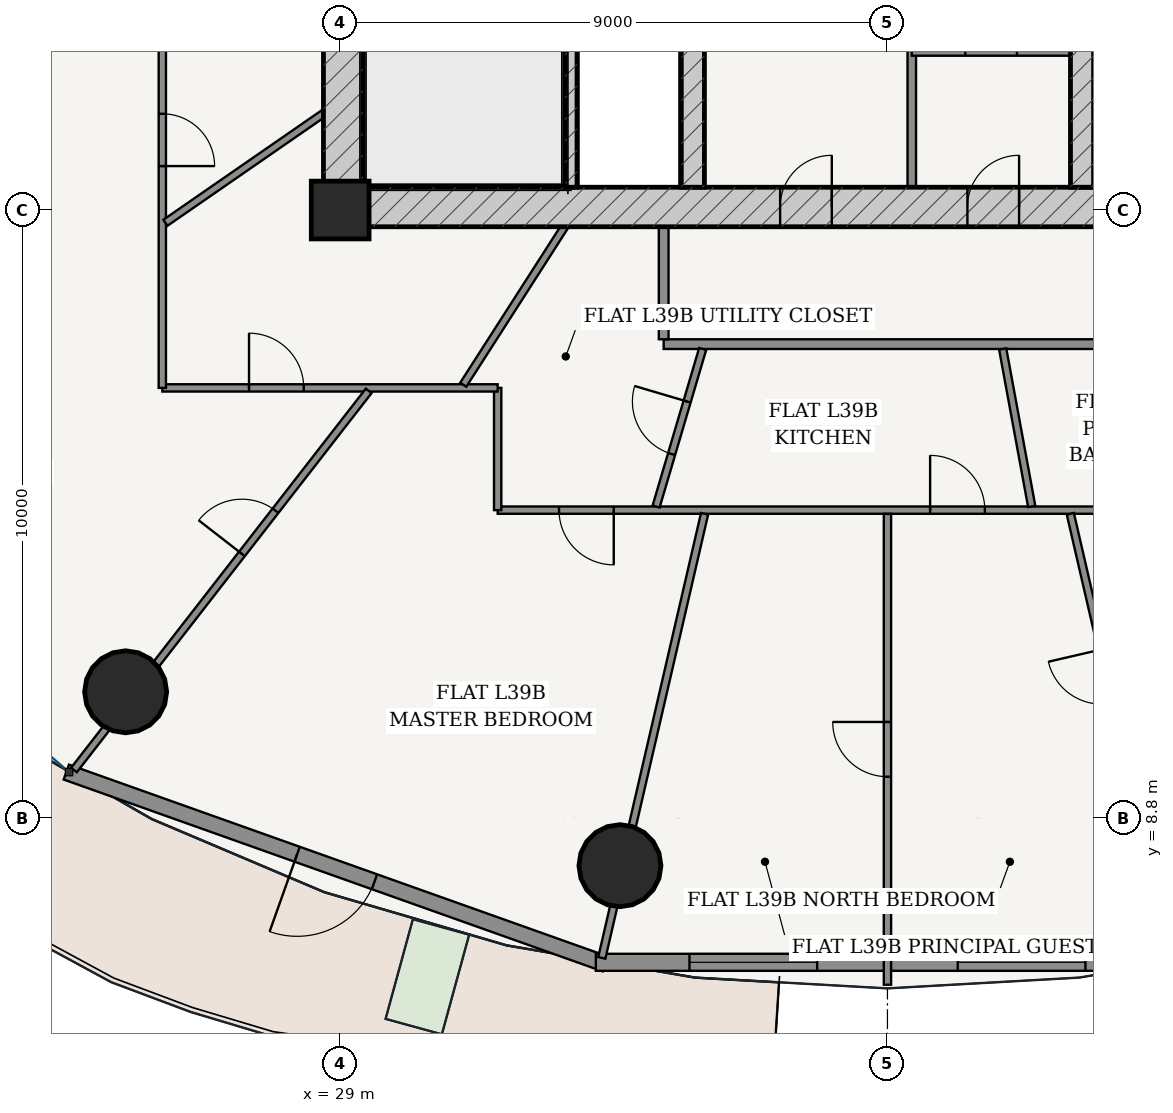
"""IFC4 building model, lengths in metres.
Left out: names, types, materials, properties, quantities, classifications, styles, units other than length and angle.
Written with IfcOpenShell. Run it as: python <this file> out.ifc"""

import sys

from ifc_helpers import new_model, si_unit, direction, frame, frame_2d, origin, origin_2d, place, context, subcontext, project, spatial, rectangle, hollow_circle, extrude, source, transform, mapped, element, fill, save


model = new_model("IFC4")
c1 = context("Model", 3, precision=1e-05, world=origin(), true_north=direction((-0.2419218956, 0.970295726276)))
c2 = subcontext(c1, "Body", "Model", "MODEL_VIEW")
j1 = project(units=[si_unit("LENGTHUNIT", "METRE"), si_unit("PLANEANGLEUNIT", "RADIAN")], contexts=[c1])
p1 = place(None, origin())
s1 = spatial("IfcSite", under=j1, at=p1, CompositionType="ELEMENT")
p2 = place(p1, origin())
s2 = spatial("IfcBuilding", under=s1, at=p2, CompositionType="ELEMENT")
p3 = place(p2, frame((0.0, 0.0, 149.8)))
s3 = spatial("IfcBuildingStorey", under=s2, at=p3, CompositionType="ELEMENT", Elevation=149.8)
p4 = place(p3, frame((29.0, 18.8, 0.0), z_axis=(0.0, 0.0, 1.0), x_axis=(1.0, 0.0, 0.0)))
e1 = element("IfcColumn", 1, at=p4, inside=s3, PredefinedType="COLUMN", context=c2, shape_type="SweptSolid", body=[
    extrude(rectangle(XDim=0.95, YDim=0.95, at=origin_2d()), origin(), (0.0, 0.0, 1.0), 3.6),
])
p5 = place(p3, frame((28.725, 18.85, 0.0), z_axis=(0.0, 0.0, 1.0), x_axis=(1.0, 0.0, 0.0)))
e2 = element("IfcWall", 2, at=p5, inside=s3, PredefinedType="SHEAR", context=c2, shape_type="SweptSolid", body=[
    extrude(rectangle(XDim=18.55, YDim=0.65, at=frame_2d((9.275, 0.0))), origin(), (0.0, 0.0, 1.0), 3.33),
])
p6 = place(p5, frame((7.51, 0.0, 0.0)))
e3 = element("IfcOpeningElement", 3, at=p6, cuts=e2, PredefinedType="OPENING", context=c2, shape_type="SweptSolid", body=[
    extrude(rectangle(XDim=0.85, YDim=2.1, at=frame_2d((0.425, 1.05))), frame((0.0, 0.335, 0.0), z_axis=(0.0, -1.0, 0.0), x_axis=(1.0, 0.0, 0.0)), (0.0, 0.0, 1.0), 0.67),
])
p7 = place(p5, frame((10.59, 0.0, 0.0)))
e4 = element("IfcOpeningElement", 4, at=p7, cuts=e2, PredefinedType="OPENING", context=c2, shape_type="SweptSolid", body=[
    extrude(rectangle(XDim=0.85, YDim=2.1, at=frame_2d((0.425, 1.05))), frame((0.0, 0.335, 0.0), z_axis=(0.0, -1.0, 0.0), x_axis=(1.0, 0.0, 0.0)), (0.0, 0.0, 1.0), 0.67),
])
p8 = place(p3, frame((29.05, 19.175, 0.0), z_axis=(0.0, 0.0, 1.0), x_axis=(0.0, 1.0, 0.0)))
e5 = element("IfcWall", 5, at=p8, inside=s3, PredefinedType="SHEAR", context=c2, shape_type="SweptSolid", body=[
    extrude(rectangle(XDim=15.25, YDim=0.65, at=frame_2d((7.625, 0.0))), origin(), (0.0, 0.0, 1.0), 3.33),
])
p9 = place(p8, frame((9.875, 0.0, 0.0)))
e6 = element("IfcOpeningElement", 6, at=p9, cuts=e5, PredefinedType="OPENING", context=c2, shape_type="SweptSolid", body=[
    extrude(rectangle(XDim=1.5, YDim=2.2, at=frame_2d((0.75, 1.1))), frame((0.0, 0.335, 0.0), z_axis=(0.0, -1.0, 0.0), x_axis=(1.0, 0.0, 0.0)), (0.0, 0.0, 1.0), 0.67),
])
p10 = place(p3, frame((32.795, 19.175, 0.0), z_axis=(0.0, 0.0, 1.0), x_axis=(0.0, 1.0, 0.0)))
e7 = element("IfcWall", 7, at=p10, inside=s3, PredefinedType="SOLIDWALL", context=c2, shape_type="SweptSolid", body=[
    extrude(rectangle(XDim=7.375, YDim=0.2, at=frame_2d((3.688, 0.0))), origin(), (0.0, 0.0, 1.0), 3.33),
])
p11 = place(p3, frame((34.8, 19.175, 0.0), z_axis=(0.0, 0.0, 1.0), x_axis=(0.0, 1.0, 0.0)))
e8 = element("IfcWall", 8, at=p11, inside=s3, PredefinedType="SHEAR", context=c2, shape_type="SweptSolid", body=[
    extrude(rectangle(XDim=15.25, YDim=0.38, at=frame_2d((7.625, 0.0))), origin(), (0.0, 0.0, 1.0), 3.33),
])
p12 = place(p11, frame((7.8, 0.0, 0.0)))
e9 = element("IfcOpeningElement", 9, at=p12, cuts=e8, PredefinedType="OPENING", context=c2, shape_type="SweptSolid", body=[
    extrude(rectangle(XDim=1.05, YDim=2.15, at=frame_2d((0.525, 1.075))), frame((0.0, 0.2, 0.0), z_axis=(0.0, -1.0, 0.0), x_axis=(1.0, 0.0, 0.0)), (0.0, 0.0, 1.0), 0.4),
])
p13 = place(p3, frame((41.2, 19.175, 0.0), z_axis=(0.0, 0.0, 1.0), x_axis=(0.0, 1.0, 0.0)))
e10 = element("IfcWall", 10, at=p13, inside=s3, PredefinedType="SHEAR", context=c2, shape_type="SweptSolid", body=[
    extrude(rectangle(XDim=15.25, YDim=0.38, at=frame_2d((7.625, 0.0))), origin(), (0.0, 0.0, 1.0), 3.33),
])
p14 = place(p13, frame((7.8, 0.0, 0.0)))
e11 = element("IfcOpeningElement", 11, at=p14, cuts=e10, PredefinedType="OPENING", context=c2, shape_type="SweptSolid", body=[
    extrude(rectangle(XDim=1.05, YDim=2.15, at=frame_2d((0.525, 1.075))), frame((0.0, 0.2, 0.0), z_axis=(0.0, -1.0, 0.0), x_axis=(1.0, 0.0, 0.0)), (0.0, 0.0, 1.0), 0.4),
])
for number, where, z_axis, x_axis in (
    (12, (25.472, 10.877, 0.0), (0.0, 0.0, 1.0), (1.0, 0.0, 0.0)),
    (13, (33.601, 8.018, 0.0), (0.0, 0.0, 1.0), (1.0, 0.0, 0.0)),
):
    element("IfcColumn", number, at=place(p3, frame(where, z_axis=z_axis, x_axis=x_axis)), inside=s3, PredefinedType="COLUMN", context=c2, shape_type="SweptSolid", body=[
        extrude(hollow_circle(Radius=0.675, WallThickness=0.042, at=origin_2d()), origin(), (0.0, 0.0, 1.0), 3.6),
    ])
p15 = place(p3, frame((24.497, 9.557, 0.0), z_axis=(0.0, 0.0, 1.0), x_axis=(0.942103604331, -0.335321932934, 0.0)))
e14 = element("IfcWall", 14, at=p15, inside=s3, PredefinedType="SOLIDWALL", context=c2, shape_type="SweptSolid", body=[
    extrude(rectangle(XDim=9.408, YDim=0.26, at=frame_2d((4.704, 0.0))), origin(), (0.0, 0.0, 1.0), 3.33),
])
p16 = place(p15, frame((4.029, 0.0, 0.0)))
e15 = element("IfcOpeningElement", 15, at=p16, cuts=e14, PredefinedType="OPENING", context=c2, shape_type="SweptSolid", body=[
    extrude(rectangle(XDim=1.35, YDim=2.2, at=frame_2d((0.675, 1.1))), frame((0.0, 0.14, 0.0), z_axis=(0.0, -1.0, 0.0), x_axis=(1.0, 0.0, 0.0)), (0.0, 0.0, 1.0), 0.28),
])
p17 = place(p3, frame((33.205, 6.429, 0.0), z_axis=(0.0, 0.0, 1.0), x_axis=(1.0, 0.0, 0.0)))
e16 = element("IfcWall", 16, at=p17, inside=s3, PredefinedType="SOLIDWALL", context=c2, shape_type="SweptSolid", body=[
    extrude(rectangle(XDim=9.591, YDim=0.28, at=frame_2d((4.795, 0.0))), origin(), (0.0, 0.0, 1.0), 3.33),
])
p18 = place(p17, frame((1.54, 0.0, 0.85)))
e17 = element("IfcOpeningElement", 17, at=p18, cuts=e16, PredefinedType="OPENING", context=c2, shape_type="SweptSolid", body=[
    extrude(rectangle(XDim=2.1, YDim=1.95, at=frame_2d((1.05, 0.975))), frame((0.0, 0.15, 0.0), z_axis=(0.0, -1.0, 0.0), x_axis=(1.0, 0.0, 0.0)), (0.0, 0.0, 1.0), 0.3),
])
p19 = place(p17, frame((5.951, 0.0, 0.85)))
e18 = element("IfcOpeningElement", 18, at=p19, cuts=e16, PredefinedType="OPENING", context=c2, shape_type="SweptSolid", body=[
    extrude(rectangle(XDim=2.1, YDim=1.95, at=frame_2d((1.05, 0.975))), frame((0.0, 0.15, 0.0), z_axis=(0.0, -1.0, 0.0), x_axis=(1.0, 0.0, 0.0)), (0.0, 0.0, 1.0), 0.3),
])
p20 = place(p3, frame((38.4, 19.175, 0.0), z_axis=(0.0, 0.0, 1.0), x_axis=(0.0, 1.0, 0.0)))
e19 = element("IfcWall", 19, at=p20, inside=s3, PredefinedType="PARTITIONING", context=c2, shape_type="SweptSolid", body=[
    extrude(rectangle(XDim=4.465, YDim=0.14, at=frame_2d((2.232, 0.0))), origin(), (0.0, 0.0, 1.0), 3.33),
])
p21 = place(p3, frame((38.4, 21.407, 0.0), z_axis=(0.0, 0.0, 1.0), x_axis=(1.0, 0.0, 0.0)))
e20 = element("IfcWall", 20, at=p21, inside=s3, PredefinedType="PARTITIONING", context=c2, shape_type="SweptSolid", body=[
    extrude(rectangle(XDim=2.61, YDim=0.14, at=frame_2d((1.305, 0.0))), origin(), (0.0, 0.0, 1.0), 3.33),
])
p22 = place(p21, frame((0.88, 0.0, 0.0)))
e21 = element("IfcOpeningElement", 21, at=p22, cuts=e20, PredefinedType="OPENING", context=c2, shape_type="SweptSolid", body=[
    extrude(rectangle(XDim=0.85, YDim=2.1, at=frame_2d((0.425, 1.05))), frame((0.0, 0.08, 0.0), z_axis=(0.0, -1.0, 0.0), x_axis=(1.0, 0.0, 0.0)), (0.0, 0.0, 1.0), 0.16),
])
p23 = place(p3, frame((34.32, 16.595, 0.0), z_axis=(0.0, 0.0, 1.0), x_axis=(1.0, 0.0, 0.0)))
e22 = element("IfcWall", 22, at=p23, inside=s3, PredefinedType="PARTITIONING", context=c2, shape_type="SweptSolid", body=[
    extrude(rectangle(XDim=14.885, YDim=0.16, at=frame_2d((7.442, 0.0))), origin(), (0.0, 0.0, 1.0), 2.776),
])
p24 = place(p23, frame((11.609, 0.0, 0.0)))
e23 = element("IfcOpeningElement", 23, at=p24, cuts=e22, PredefinedType="OPENING", context=c2, shape_type="SweptSolid", body=[
    extrude(rectangle(XDim=0.98, YDim=2.2, at=frame_2d((0.49, 1.1))), frame((0.0, 0.09, 0.0), z_axis=(0.0, -1.0, 0.0), x_axis=(1.0, 0.0, 0.0)), (0.0, 0.0, 1.0), 0.18),
])
p25 = place(p3, frame((34.32, 16.675, 0.0), z_axis=(0.0, 0.0, 1.0), x_axis=(0.0, 1.0, 0.0)))
e24 = element("IfcWall", 24, at=p25, inside=s3, PredefinedType="PARTITIONING", context=c2, shape_type="SweptSolid", body=[
    extrude(rectangle(XDim=1.85, YDim=0.16, at=frame_2d((0.925, 0.0))), origin(), (0.0, 0.0, 1.0), 3.33),
])
p26 = place(p3, frame((28.723, 23.497, 0.0), z_axis=(0.0, 0.0, 1.0), x_axis=(-0.942077095572, -0.335396401292, 0.0)))
e25 = element("IfcWall", 25, at=p26, inside=s3, PredefinedType="PARTITIONING", context=c2, shape_type="SweptSolid", body=[
    extrude(rectangle(XDim=13.823, YDim=0.2, at=frame_2d((6.912, 0.0))), origin(), (0.0, 0.0, 1.0), 2.846),
])
p27 = place(p3, frame((51.935, 13.865, 0.0), z_axis=(0.0, 0.0, 1.0), x_axis=(-1.0, 0.0, 0.0)))
e26 = element("IfcWall", 26, at=p27, inside=s3, PredefinedType="PARTITIONING", context=c2, shape_type="SweptSolid", body=[
    extrude(rectangle(XDim=20.345, YDim=0.12, at=frame_2d((10.172, 0.0))), origin(), (0.0, 0.0, 1.0), 2.776),
])
p28 = place(p27, frame((2.985, 0.0, 0.0)))
e27 = element("IfcOpeningElement", 27, at=p28, cuts=e26, PredefinedType="OPENING", context=c2, shape_type="SweptSolid", body=[
    extrude(rectangle(XDim=0.9, YDim=2.15, at=frame_2d((0.45, 1.075))), frame((0.0, 0.07, 0.0), z_axis=(0.0, -1.0, 0.0), x_axis=(1.0, 0.0, 0.0)), (0.0, 0.0, 1.0), 0.14),
])
p29 = place(p27, frame((12.333, 0.0, 0.0)))
e28 = element("IfcOpeningElement", 28, at=p29, cuts=e26, PredefinedType="OPENING", context=c2, shape_type="SweptSolid", body=[
    extrude(rectangle(XDim=0.9, YDim=2.15, at=frame_2d((0.45, 1.075))), frame((0.0, 0.07, 0.0), z_axis=(0.0, -1.0, 0.0), x_axis=(1.0, 0.0, 0.0)), (0.0, 0.0, 1.0), 0.14),
])
p30 = place(p27, frame((18.436, 0.0, 0.0)))
e29 = element("IfcOpeningElement", 29, at=p30, cuts=e26, PredefinedType="OPENING", context=c2, shape_type="SweptSolid", body=[
    extrude(rectangle(XDim=0.9, YDim=2.15, at=frame_2d((0.45, 1.075))), frame((0.0, 0.07, 0.0), z_axis=(0.0, -1.0, 0.0), x_axis=(1.0, 0.0, 0.0)), (0.0, 0.0, 1.0), 0.14),
])
p31 = place(p3, frame((31.59, 13.865, 0.0), z_axis=(0.0, 0.0, 1.0), x_axis=(0.0, 1.0, 0.0)))
e30 = element("IfcWall", 30, at=p31, inside=s3, PredefinedType="PARTITIONING", context=c2, shape_type="SweptSolid", body=[
    extrude(rectangle(XDim=2.01, YDim=0.12, at=frame_2d((1.005, 0.0))), origin(), (0.0, 0.0, 1.0), 3.005),
])
p32 = place(p3, frame((31.59, 15.875, 0.0), z_axis=(0.0, 0.0, 1.0), x_axis=(-1.0, 0.0, 0.0)))
e31 = element("IfcWall", 31, at=p32, inside=s3, PredefinedType="PARTITIONING", context=c2, shape_type="SweptSolid", body=[
    extrude(rectangle(XDim=5.515, YDim=0.12, at=frame_2d((2.758, 0.0))), origin(), (0.0, 0.0, 1.0), 2.776),
])
p33 = place(p32, frame((3.189, 0.0, 0.0)))
e32 = element("IfcOpeningElement", 32, at=p33, cuts=e31, PredefinedType="OPENING", context=c2, shape_type="SweptSolid", body=[
    extrude(rectangle(XDim=0.9, YDim=2.15, at=frame_2d((0.45, 1.075))), frame((0.0, 0.07, 0.0), z_axis=(0.0, -1.0, 0.0), x_axis=(1.0, 0.0, 0.0)), (0.0, 0.0, 1.0), 0.14),
])
p34 = place(p3, frame((26.075, 15.875, 0.0), z_axis=(0.0, 0.0, 1.0), x_axis=(0.0, 1.0, 0.0)))
e33 = element("IfcWall", 33, at=p34, inside=s3, PredefinedType="PARTITIONING", context=c2, shape_type="SweptSolid", body=[
    extrude(rectangle(XDim=5.715, YDim=0.12, at=frame_2d((2.857, 0.0))), origin(), (0.0, 0.0, 1.0), 2.776),
])
p35 = place(p34, frame((3.648, 0.0, 0.0)))
e34 = element("IfcOpeningElement", 34, at=p35, cuts=e33, PredefinedType="OPENING", context=c2, shape_type="SweptSolid", body=[
    extrude(rectangle(XDim=0.86, YDim=2.15, at=frame_2d((0.43, 1.075))), frame((0.0, 0.07, 0.0), z_axis=(0.0, -1.0, 0.0), x_axis=(1.0, 0.0, 0.0)), (0.0, 0.0, 1.0), 0.14),
])
p36 = place(p3, frame((29.469, 15.826, 0.0), z_axis=(0.0, 0.0, 1.0), x_axis=(-0.61373942367, -0.789508657225, 0.0)))
e35 = element("IfcWall", 35, at=p36, inside=s3, PredefinedType="PARTITIONING", context=c2, shape_type="SweptSolid", body=[
    extrude(rectangle(XDim=7.898, YDim=0.12, at=frame_2d((3.949, 0.0))), origin(), (0.0, 0.0, 1.0), 2.776),
])
p37 = place(p36, frame((2.496, 0.0, 0.0)))
e36 = element("IfcOpeningElement", 36, at=p37, cuts=e35, PredefinedType="OPENING", context=c2, shape_type="SweptSolid", body=[
    extrude(rectangle(XDim=0.9, YDim=2.15, at=frame_2d((0.45, 1.075))), frame((0.0, 0.07, 0.0), z_axis=(0.0, -1.0, 0.0), x_axis=(1.0, 0.0, 0.0)), (0.0, 0.0, 1.0), 0.14),
])
p38 = place(p3, frame((34.992, 13.805, 0.0), z_axis=(0.0, 0.0, 1.0), x_axis=(-0.225447000045, -0.974255433739, 0.0)))
e37 = element("IfcWall", 37, at=p38, inside=s3, PredefinedType="PARTITIONING", context=c2, shape_type="SweptSolid", body=[
    extrude(rectangle(XDim=7.496, YDim=0.12, at=frame_2d((3.748, 0.0))), origin(), (0.0, 0.0, 1.0), 2.776),
])
p39 = place(p3, frame((38.0, 13.803, 0.0), z_axis=(0.0, 0.0, 1.0), x_axis=(0.0, -1.0, 0.0)))
e38 = element("IfcWall", 38, at=p39, inside=s3, PredefinedType="PARTITIONING", context=c2, shape_type="SweptSolid", body=[
    extrude(rectangle(XDim=7.743, YDim=0.12, at=frame_2d((3.872, 0.0))), origin(), (0.0, 0.0, 1.0), 2.846),
])
p40 = place(p39, frame((3.421, 0.0, 0.0)))
e39 = element("IfcOpeningElement", 39, at=p40, cuts=e38, PredefinedType="OPENING", context=c2, shape_type="SweptSolid", body=[
    extrude(rectangle(XDim=0.9, YDim=2.15, at=frame_2d((0.45, 1.075))), frame((0.0, 0.07, 0.0), z_axis=(0.0, -1.0, 0.0), x_axis=(1.0, 0.0, 0.0)), (0.0, 0.0, 1.0), 0.14),
])
p41 = place(p3, frame((41.008, 13.805, 0.0), z_axis=(0.0, 0.0, 1.0), x_axis=(0.225447000045, -0.974255433739, 0.0)))
e40 = element("IfcWall", 40, at=p41, inside=s3, PredefinedType="PARTITIONING", context=c2, shape_type="SweptSolid", body=[
    extrude(rectangle(XDim=7.496, YDim=0.12, at=frame_2d((3.748, 0.0))), origin(), (0.0, 0.0, 1.0), 2.776),
])
p42 = place(p41, frame((2.289, 0.0, 0.0)))
e41 = element("IfcOpeningElement", 41, at=p42, cuts=e40, PredefinedType="OPENING", context=c2, shape_type="SweptSolid", body=[
    extrude(rectangle(XDim=0.9, YDim=2.15, at=frame_2d((0.45, 1.075))), frame((0.0, 0.07, 0.0), z_axis=(0.0, -1.0, 0.0), x_axis=(1.0, 0.0, 0.0)), (0.0, 0.0, 1.0), 0.14),
])
p43 = place(p3, frame((28.723, 20.386, 0.0), z_axis=(0.0, 0.0, 1.0), x_axis=(-0.822570551556, -0.568663070467, 0.0)))
e42 = element("IfcWall", 42, at=p43, inside=s3, PredefinedType="PARTITIONING", context=c2, shape_type="SweptSolid", body=[
    extrude(rectangle(XDim=3.158, YDim=0.12, at=frame_2d((1.579, 0.0))), origin(), (0.0, 0.0, 1.0), 3.33),
])
p44 = place(p3, frame((32.691, 18.525, 0.0), z_axis=(0.0, 0.0, 1.0), x_axis=(-0.54002976428, -0.841645919429, 0.0)))
e43 = element("IfcWall", 43, at=p44, inside=s3, PredefinedType="PARTITIONING", context=c2, shape_type="SweptSolid", body=[
    extrude(rectangle(XDim=3.086, YDim=0.12, at=frame_2d((1.543, 0.0))), origin(), (0.0, 0.0, 1.0), 3.33),
])
p45 = place(p3, frame((34.961, 16.515, 0.0), z_axis=(0.0, 0.0, 1.0), x_axis=(-0.283365034326, -0.959012125743, 0.0)))
e44 = element("IfcWall", 44, at=p45, inside=s3, PredefinedType="PARTITIONING", context=c2, shape_type="SweptSolid", body=[
    extrude(rectangle(XDim=2.701, YDim=0.12, at=frame_2d((1.351, 0.0))), origin(), (0.0, 0.0, 1.0), 3.33),
])
p46 = place(p45, frame((0.901, 0.0, 0.0)))
e45 = element("IfcOpeningElement", 45, at=p46, cuts=e44, PredefinedType="OPENING", context=c2, shape_type="SweptSolid", body=[
    extrude(rectangle(XDim=0.9, YDim=2.15, at=frame_2d((0.45, 1.075))), frame((0.0, 0.07, 0.0), z_axis=(0.0, -1.0, 0.0), x_axis=(1.0, 0.0, 0.0)), (0.0, 0.0, 1.0), 0.14),
])
p47 = place(p3, frame((39.895, 16.515, 0.0), z_axis=(0.0, 0.0, 1.0), x_axis=(0.181219081065, -0.983442751083, 0.0)))
e46 = element("IfcWall", 46, at=p47, inside=s3, PredefinedType="PARTITIONING", context=c2, shape_type="SweptSolid", body=[
    extrude(rectangle(XDim=2.633, YDim=0.12, at=frame_2d((1.316, 0.0))), origin(), (0.0, 0.0, 1.0), 3.33),
])
m1 = source(origin(), c2, "Body", "SweptSolid", [
    extrude(rectangle(XDim=1.35, YDim=2.2, at=frame_2d((0.675, 1.1))), frame((0.0, 0.025, 0.0), z_axis=(0.0, -1.0, 0.0), x_axis=(1.0, 0.0, 0.0)), (0.0, 0.0, 1.0), 0.05),
])
p48 = place(p16, frame((1.35, 0.0, 0.0), z_axis=(0.0, 0.0, 1.0), x_axis=(-1.0, 0.0, 0.0)))
e47 = element("IfcDoor", 47, at=p48, inside=s3, OperationType="SINGLE_SWING_RIGHT", PredefinedType="DOOR", context=c2, shape_type="MappedRepresentation", body=[
    mapped(m1, transform((0.0, 0.0, 0.0), scale=1.0)),
])
fill(e15, e47)
m2 = source(origin(), c2, "Body", "SweptSolid", [
    extrude(rectangle(XDim=2.1, YDim=1.95, at=frame_2d((1.05, 0.975))), frame((0.0, 0.03, 0.0), z_axis=(0.0, -1.0, 0.0), x_axis=(1.0, 0.0, 0.0)), (0.0, 0.0, 1.0), 0.06),
])
p49 = place(p18, origin())
e48 = element("IfcWindow", 48, at=p49, inside=s3, PartitioningType="SINGLE_PANEL", PredefinedType="WINDOW", context=c2, shape_type="MappedRepresentation", body=[
    mapped(m2, transform((0.0, 0.0, 0.0), scale=1.0)),
])
fill(e17, e48)
p50 = place(p19, origin())
e49 = element("IfcWindow", 49, at=p50, inside=s3, PartitioningType="SINGLE_PANEL", PredefinedType="WINDOW", context=c2, shape_type="MappedRepresentation", body=[
    mapped(m2, transform((0.0, 0.0, 0.0), scale=1.0)),
])
fill(e18, e49)
m3 = source(origin(), c2, "Body", "SweptSolid", [
    extrude(rectangle(XDim=0.85, YDim=2.1, at=frame_2d((0.425, 1.05))), frame((0.0, 0.025, 0.0), z_axis=(0.0, -1.0, 0.0), x_axis=(1.0, 0.0, 0.0)), (0.0, 0.0, 1.0), 0.05),
])
p51 = place(p6, origin())
e50 = element("IfcDoor", 50, at=p51, inside=s3, OperationType="SINGLE_SWING_RIGHT", PredefinedType="DOOR", context=c2, shape_type="MappedRepresentation", body=[
    mapped(m3, transform((0.0, 0.0, 0.0), scale=1.0)),
])
fill(e3, e50)
p52 = place(p7, origin())
e51 = element("IfcDoor", 51, at=p52, inside=s3, OperationType="SINGLE_SWING_RIGHT", PredefinedType="DOOR", context=c2, shape_type="MappedRepresentation", body=[
    mapped(m3, transform((0.0, 0.0, 0.0), scale=1.0)),
])
fill(e4, e51)
p53 = place(p22, origin())
e52 = element("IfcDoor", 52, at=p53, inside=s3, OperationType="SINGLE_SWING_LEFT", PredefinedType="DOOR", context=c2, shape_type="MappedRepresentation", body=[
    mapped(m3, transform((0.0, 0.0, 0.0), scale=1.0)),
])
fill(e21, e52)
m4 = source(origin(), c2, "Body", "SweptSolid", [
    extrude(rectangle(XDim=0.9, YDim=2.15, at=frame_2d((0.45, 1.075))), frame((0.0, 0.025, 0.0), z_axis=(0.0, -1.0, 0.0), x_axis=(1.0, 0.0, 0.0)), (0.0, 0.0, 1.0), 0.05),
])
p54 = place(p29, frame((0.9, 0.0, 0.0), z_axis=(0.0, 0.0, 1.0), x_axis=(-1.0, 0.0, 0.0)))
e53 = element("IfcDoor", 53, at=p54, inside=s3, OperationType="SINGLE_SWING_LEFT", PredefinedType="DOOR", context=c2, shape_type="MappedRepresentation", body=[
    mapped(m4, transform((0.0, 0.0, 0.0), scale=1.0)),
])
fill(e28, e53)
p55 = place(p46, frame((0.9, 0.0, 0.0), z_axis=(0.0, 0.0, 1.0), x_axis=(-1.0, 0.0, 0.0)))
e54 = element("IfcDoor", 54, at=p55, inside=s3, OperationType="SINGLE_SWING_RIGHT", PredefinedType="DOOR", context=c2, shape_type="MappedRepresentation", body=[
    mapped(m4, transform((0.0, 0.0, 0.0), scale=1.0)),
])
fill(e45, e54)
p56 = place(p30, origin())
e55 = element("IfcDoor", 55, at=p56, inside=s3, OperationType="SINGLE_SWING_LEFT", PredefinedType="DOOR", context=c2, shape_type="MappedRepresentation", body=[
    mapped(m4, transform((0.0, 0.0, 0.0), scale=1.0)),
])
fill(e29, e55)
p57 = place(p40, frame((0.9, 0.0, 0.0), z_axis=(0.0, 0.0, 1.0), x_axis=(-1.0, 0.0, 0.0)))
e56 = element("IfcDoor", 56, at=p57, inside=s3, OperationType="SINGLE_SWING_RIGHT", PredefinedType="DOOR", context=c2, shape_type="MappedRepresentation", body=[
    mapped(m4, transform((0.0, 0.0, 0.0), scale=1.0)),
])
fill(e39, e56)
p58 = place(p37, frame((0.9, 0.0, 0.0), z_axis=(0.0, 0.0, 1.0), x_axis=(-1.0, 0.0, 0.0)))
e57 = element("IfcDoor", 57, at=p58, inside=s3, OperationType="SINGLE_SWING_LEFT", PredefinedType="DOOR", context=c2, shape_type="MappedRepresentation", body=[
    mapped(m4, transform((0.0, 0.0, 0.0), scale=1.0)),
])
fill(e36, e57)
m5 = source(origin(), c2, "Body", "SweptSolid", [
    extrude(rectangle(XDim=0.86, YDim=2.15, at=frame_2d((0.43, 1.075))), frame((0.0, 0.025, 0.0), z_axis=(0.0, -1.0, 0.0), x_axis=(1.0, 0.0, 0.0)), (0.0, 0.0, 1.0), 0.05),
])
p59 = place(p35, frame((0.86, 0.0, 0.0), z_axis=(0.0, 0.0, 1.0), x_axis=(-1.0, 0.0, 0.0)))
e58 = element("IfcDoor", 58, at=p59, inside=s3, OperationType="SINGLE_SWING_RIGHT", PredefinedType="DOOR", context=c2, shape_type="MappedRepresentation", body=[
    mapped(m5, transform((0.0, 0.0, 0.0), scale=1.0)),
])
fill(e34, e58)
p60 = place(p33, frame((0.9, 0.0, 0.0), z_axis=(0.0, 0.0, 1.0), x_axis=(-1.0, 0.0, 0.0)))
e59 = element("IfcDoor", 59, at=p60, inside=s3, OperationType="SINGLE_SWING_LEFT", PredefinedType="DOOR", context=c2, shape_type="MappedRepresentation", body=[
    mapped(m4, transform((0.0, 0.0, 0.0), scale=1.0)),
])
fill(e32, e59)
save(model, sys.argv[1])
